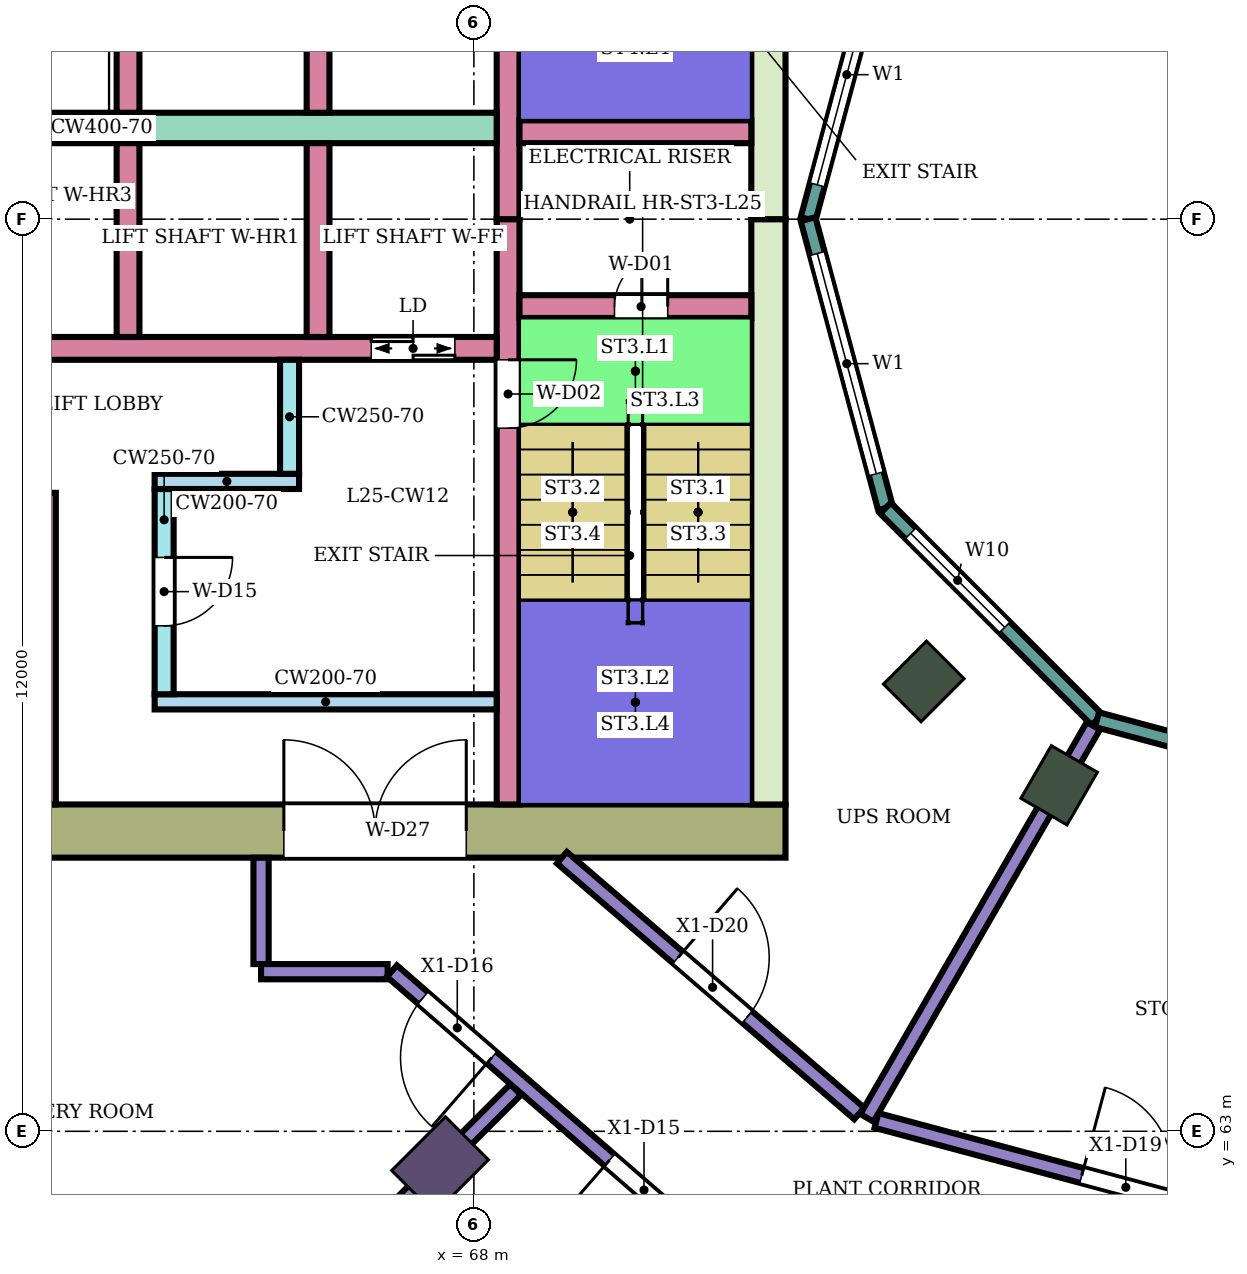
"""IFC4 building model, lengths in metres.
Left out: names, types, materials, properties, quantities, classifications, styles, units other than length and angle.
Written with IfcOpenShell. Run it as: python <this file> out.ifc"""

import sys

from ifc_helpers import new_model, si_unit, direction, frame, frame_2d, origin, origin_2d, place, context, subcontext, project, spatial, rectangle, extrude, element, fill, save


model = new_model("IFC4")
c1 = context("Model", 3, precision=1e-05, world=origin(), true_north=direction((0.0, 1.0)))
c2 = subcontext(c1, "Body", "Model", "MODEL_VIEW")
j1 = project(units=[si_unit("LENGTHUNIT", "METRE"), si_unit("PLANEANGLEUNIT", "RADIAN")], contexts=[c1])
p1 = place(None, origin())
s1 = spatial("IfcSite", under=j1, at=p1, CompositionType="ELEMENT")
p2 = place(p1, origin())
s2 = spatial("IfcBuilding", under=s1, at=p2, CompositionType="ELEMENT")
p3 = place(p2, frame((0.0, 0.0, 109.0)))
s3 = spatial("IfcBuildingStorey", under=s2, at=p3, CompositionType="ELEMENT", Elevation=109.0)
p4 = place(p3, frame((67.555, 62.555, 0.0), z_axis=(0.0, 0.0, 1.0), x_axis=(-0.707106781187, -0.707106781187, 0.0)))
e1 = element("IfcColumn", 1, at=p4, inside=s3, PredefinedType="COLUMN", context=c2, shape_type="SweptSolid", body=[
    extrude(rectangle(XDim=1.0, YDim=0.8, at=origin_2d()), origin(), (0.0, 0.0, 1.0), 5.6),
])
for number, where, z_axis, x_axis in (
    (2, (73.919, 68.919, 0.0), (0.0, 0.0, 1.0), (-0.707, -0.707, 0.0)),
    (3, (75.7, 67.552, 0.0), (0.0, 0.0, 1.0), (-0.5, -0.866, 0.0)),
):
    element("IfcColumn", number, at=place(p3, frame(where, z_axis=z_axis, x_axis=x_axis)), inside=s3, PredefinedType="COLUMN", context=c2, shape_type="SweptSolid", body=[
        extrude(rectangle(XDim=0.8, YDim=0.7, at=origin_2d()), origin(), (0.0, 0.0, 1.0), 5.6),
    ])
p5 = place(p3, frame((72.1, 66.95, 0.0), z_axis=(0.0, 0.0, 1.0), x_axis=(-1.0, 0.0, 0.0)))
e4 = element("IfcWall", 4, at=p5, inside=s3, PredefinedType="SHEAR", context=c2, shape_type="SweptSolid", body=[
    extrude(rectangle(XDim=14.8, YDim=0.7, at=frame_2d((7.4, 0.0))), origin(), (0.0, 0.0, 1.0), 5.28),
])
p6 = place(p5, frame((4.2, 0.0, 0.0)))
e5 = element("IfcOpeningElement", 5, at=p6, cuts=e4, PredefinedType="OPENING", context=c2, shape_type="SweptSolid", body=[
    extrude(rectangle(XDim=2.4, YDim=2.4, at=frame_2d((1.2, 1.2))), frame((0.0, 0.36, 0.0), z_axis=(0.0, -1.0, 0.0), x_axis=(1.0, 0.0, 0.0)), (0.0, 0.0, 1.0), 0.72),
])
for number, where, z_axis, x_axis in (
    (6, (71.875, 75.0, 0.0), (0.0, 0.0, 1.0), (0.0, -1.0, 0.0)),
    (7, (71.875, 82.7, 0.0), (0.0, 0.0, 1.0), (0.0, -1.0, 0.0)),
):
    element("IfcWall", number, at=place(p3, frame(where, z_axis=z_axis, x_axis=x_axis)), inside=s3, PredefinedType="SHEAR", context=c2, shape_type="SweptSolid", body=[
        extrude(rectangle(XDim=7.7, YDim=0.45, at=frame_2d((3.85, 0.0))), origin(), (0.0, 0.0, 1.0), 5.28),
    ])
p7 = place(p3, frame((68.45, 75.0, 0.0), z_axis=(0.0, 0.0, 1.0), x_axis=(0.0, -1.0, 0.0)))
e8 = element("IfcWall", 8, at=p7, inside=s3, PredefinedType="SHEAR", context=c2, shape_type="SweptSolid", body=[
    extrude(rectangle(XDim=7.7, YDim=0.3, at=frame_2d((3.85, 0.0))), origin(), (0.0, 0.0, 1.0), 5.28),
])
p8 = place(p7, frame((1.85, 0.0, 0.0)))
e9 = element("IfcOpeningElement", 9, at=p8, cuts=e8, PredefinedType="OPENING", context=c2, shape_type="SweptSolid", body=[
    extrude(rectangle(XDim=0.9, YDim=2.1, at=frame_2d((0.45, 1.05))), frame((0.0, 0.16, 0.0), z_axis=(0.0, -1.0, 0.0), x_axis=(1.0, 0.0, 0.0)), (0.0, 0.0, 1.0), 0.32),
])
p9 = place(p3, frame((68.45, 82.7, 0.0), z_axis=(0.0, 0.0, 1.0), x_axis=(0.0, -1.0, 0.0)))
e10 = element("IfcWall", 10, at=p9, inside=s3, PredefinedType="SHEAR", context=c2, shape_type="SweptSolid", body=[
    extrude(rectangle(XDim=7.7, YDim=0.3, at=frame_2d((3.85, 0.0))), origin(), (0.0, 0.0, 1.0), 5.28),
])
p10 = place(p9, frame((0.35, 0.0, 0.0)))
e11 = element("IfcOpeningElement", 11, at=p10, cuts=e10, PredefinedType="OPENING", context=c2, shape_type="SweptSolid", body=[
    extrude(rectangle(XDim=0.9, YDim=2.1, at=frame_2d((0.45, 1.05))), frame((0.0, 0.16, 0.0), z_axis=(0.0, -1.0, 0.0), x_axis=(1.0, 0.0, 0.0)), (0.0, 0.0, 1.0), 0.32),
])
p11 = place(p3, frame((71.65, 73.85, 0.0), z_axis=(0.0, 0.0, 1.0), x_axis=(-1.0, 0.0, 0.0)))
e12 = element("IfcWall", 12, at=p11, inside=s3, PredefinedType="SHEAR", context=c2, shape_type="SweptSolid", body=[
    extrude(rectangle(XDim=3.05, YDim=0.3, at=frame_2d((1.525, 0.0))), origin(), (0.0, 0.0, 1.0), 5.28),
])
p12 = place(p11, frame((1.1, 0.0, 0.0)))
e13 = element("IfcOpeningElement", 13, at=p12, cuts=e12, PredefinedType="OPENING", context=c2, shape_type="SweptSolid", body=[
    extrude(rectangle(XDim=0.7, YDim=2.0, at=frame_2d((0.35, 1.0))), frame((0.0, 0.16, 0.0), z_axis=(0.0, -1.0, 0.0), x_axis=(1.0, 0.0, 0.0)), (0.0, 0.0, 1.0), 0.32),
])
p13 = place(p3, frame((71.65, 76.15, 0.0), z_axis=(0.0, 0.0, 1.0), x_axis=(-1.0, 0.0, 0.0)))
e14 = element("IfcWall", 14, at=p13, inside=s3, PredefinedType="SHEAR", context=c2, shape_type="SweptSolid", body=[
    extrude(rectangle(XDim=3.05, YDim=0.3, at=frame_2d((1.525, 0.0))), origin(), (0.0, 0.0, 1.0), 5.28),
])
p14 = place(p3, frame((68.3, 73.3, 0.0), z_axis=(0.0, 0.0, 1.0), x_axis=(-1.0, 0.0, 0.0)))
e15 = element("IfcWall", 15, at=p14, inside=s3, PredefinedType="SHEAR", context=c2, shape_type="SweptSolid", body=[
    extrude(rectangle(XDim=11.0, YDim=0.3, at=frame_2d((5.5, 0.0))), origin(), (0.0, 0.0, 1.0), 5.28),
])
p15 = place(p14, frame((0.55, 0.0, 0.0)))
e16 = element("IfcOpeningElement", 16, at=p15, cuts=e15, PredefinedType="OPENING", context=c2, shape_type="SweptSolid", body=[
    extrude(rectangle(XDim=1.1, YDim=2.1, at=frame_2d((0.55, 1.05))), frame((0.0, 0.16, 0.0), z_axis=(0.0, -1.0, 0.0), x_axis=(1.0, 0.0, 0.0)), (0.0, 0.0, 1.0), 0.32),
])
p16 = place(p14, frame((8.1, 0.0, 0.0)))
e17 = element("IfcOpeningElement", 17, at=p16, cuts=e15, PredefinedType="OPENING", context=c2, shape_type="SweptSolid", body=[
    extrude(rectangle(XDim=1.0, YDim=2.1, at=frame_2d((0.5, 1.05))), frame((0.0, 0.16, 0.0), z_axis=(0.0, -1.0, 0.0), x_axis=(1.0, 0.0, 0.0)), (0.0, 0.0, 1.0), 0.32),
])
p17 = place(p3, frame((68.3, 76.2, 0.0), z_axis=(0.0, 0.0, 1.0), x_axis=(-1.0, 0.0, 0.0)))
e18 = element("IfcWall", 18, at=p17, inside=s3, PredefinedType="SHEAR", context=c2, shape_type="SweptSolid", body=[
    extrude(rectangle(XDim=11.0, YDim=0.4, at=frame_2d((5.5, 0.0))), origin(), (0.0, 0.0, 1.0), 5.28),
])
for number, where, z_axis, x_axis in (
    (19, (65.95, 76.0, 0.0), (0.0, 0.0, 1.0), (0.0, -1.0, 0.0)),
    (20, (63.45, 76.0, 0.0), (0.0, 0.0, 1.0), (0.0, -1.0, 0.0)),
    (21, (65.95, 78.95, 0.0), (0.0, 0.0, 1.0), (0.0, -1.0, 0.0)),
    (22, (63.45, 78.95, 0.0), (0.0, 0.0, 1.0), (0.0, -1.0, 0.0)),
):
    element("IfcWall", number, at=place(p3, frame(where, z_axis=z_axis, x_axis=x_axis)), inside=s3, PredefinedType="SHEAR", context=c2, shape_type="SweptSolid", body=[
        extrude(rectangle(XDim=2.55, YDim=0.3, at=frame_2d((1.275, 0.0))), origin(), (0.0, 0.0, 1.0), 5.28),
    ])
p18 = place(p3, frame((68.3, 68.65, 0.0), z_axis=(0.0, 0.0, 1.0), x_axis=(-1.0, 0.0, 0.0)))
e23 = element("IfcWall", 23, at=p18, inside=s3, PredefinedType="SHEAR", context=c2, shape_type="SweptSolid", body=[
    extrude(rectangle(XDim=4.5, YDim=0.2, at=frame_2d((2.25, 0.0))), origin(), (0.0, 0.0, 1.0), 5.28),
])
p19 = place(p3, frame((63.925, 71.45, 0.0), z_axis=(0.0, 0.0, 1.0), x_axis=(0.0, -1.0, 0.0)))
e24 = element("IfcWall", 24, at=p19, inside=s3, PredefinedType="SHEAR", context=c2, shape_type="SweptSolid", body=[
    extrude(rectangle(XDim=2.7, YDim=0.25, at=frame_2d((1.35, 0.0))), origin(), (0.0, 0.0, 1.0), 5.28),
])
p20 = place(p19, frame((0.9, 0.0, 0.0)))
e25 = element("IfcOpeningElement", 25, at=p20, cuts=e24, PredefinedType="OPENING", context=c2, shape_type="SweptSolid", body=[
    extrude(rectangle(XDim=0.9, YDim=2.1, at=frame_2d((0.45, 1.05))), frame((0.0, 0.135, 0.0), z_axis=(0.0, -1.0, 0.0), x_axis=(1.0, 0.0, 0.0)), (0.0, 0.0, 1.0), 0.27),
])
p21 = place(p3, frame((65.7, 71.55, 0.0), z_axis=(0.0, 0.0, 1.0), x_axis=(-1.0, 0.0, 0.0)))
e26 = element("IfcWall", 26, at=p21, inside=s3, PredefinedType="SHEAR", context=c2, shape_type="SweptSolid", body=[
    extrude(rectangle(XDim=1.9, YDim=0.2, at=frame_2d((0.95, 0.0))), origin(), (0.0, 0.0, 1.0), 5.28),
])
p22 = place(p3, frame((65.575, 73.15, 0.0), z_axis=(0.0, 0.0, 1.0), x_axis=(0.0, -1.0, 0.0)))
e27 = element("IfcWall", 27, at=p22, inside=s3, PredefinedType="SHEAR", context=c2, shape_type="SweptSolid", body=[
    extrude(rectangle(XDim=1.5, YDim=0.25, at=frame_2d((0.75, 0.0))), origin(), (0.0, 0.0, 1.0), 5.28),
])
p23 = place(p3, frame((62.35, 71.4, 0.0), z_axis=(0.0, 0.0, 1.0), x_axis=(0.0, -1.0, 0.0)))
e28 = element("IfcWall", 28, at=p23, inside=s3, PredefinedType="SHEAR", context=c2, shape_type="SweptSolid", body=[
    extrude(rectangle(XDim=4.1, YDim=0.3, at=frame_2d((2.05, 0.0))), origin(), (0.0, 0.0, 1.0), 5.28),
])
p24 = place(p3, frame((73.415, 78.802, 0.0), z_axis=(0.0, 0.0, 1.0), x_axis=(-0.258789828301, -0.965933654434, 0.0)))
e29 = element("IfcWall", 29, at=p24, inside=s3, PredefinedType="NOTDEFINED", context=c2, shape_type="SweptSolid", body=[
    extrude(rectangle(XDim=3.936, YDim=0.2, at=frame_2d((1.968, 0.0))), origin(), (0.0, 0.0, 1.0), 5.6),
])
p25 = place(p24, frame((0.468, 0.0, 0.9)))
e30 = element("IfcOpeningElement", 30, at=p25, cuts=e29, PredefinedType="OPENING", context=c2, shape_type="SweptSolid", body=[
    extrude(rectangle(XDim=3.0, YDim=2.3, at=frame_2d((1.5, 1.15))), frame((0.0, 0.11, 0.0), z_axis=(0.0, -1.0, 0.0), x_axis=(1.0, 0.0, 0.0)), (0.0, 0.0, 1.0), 0.22),
])
p26 = place(p3, frame((72.396, 75.0, 0.0), z_axis=(0.0, 0.0, 1.0), x_axis=(0.258789828301, -0.965933654434, 0.0)))
e31 = element("IfcWall", 31, at=p26, inside=s3, PredefinedType="NOTDEFINED", context=c2, shape_type="SweptSolid", body=[
    extrude(rectangle(XDim=3.936, YDim=0.2, at=frame_2d((1.968, 0.0))), origin(), (0.0, 0.0, 1.0), 5.6),
])
p27 = place(p26, frame((0.468, 0.0, 0.9)))
e32 = element("IfcOpeningElement", 32, at=p27, cuts=e31, PredefinedType="OPENING", context=c2, shape_type="SweptSolid", body=[
    extrude(rectangle(XDim=3.0, YDim=2.3, at=frame_2d((1.5, 1.15))), frame((0.0, 0.11, 0.0), z_axis=(0.0, -1.0, 0.0), x_axis=(1.0, 0.0, 0.0)), (0.0, 0.0, 1.0), 0.22),
])
p28 = place(p3, frame((73.415, 71.198, 0.0), z_axis=(0.0, 0.0, 1.0), x_axis=(0.707106781187, -0.707106781187, 0.0)))
e33 = element("IfcWall", 33, at=p28, inside=s3, PredefinedType="NOTDEFINED", context=c2, shape_type="SweptSolid", body=[
    extrude(rectangle(XDim=3.936, YDim=0.2, at=frame_2d((1.968, 0.0))), origin(), (0.0, 0.0, 1.0), 5.6),
])
p29 = place(p28, frame((0.468, 0.0, 0.9)))
e34 = element("IfcOpeningElement", 34, at=p29, cuts=e33, PredefinedType="OPENING", context=c2, shape_type="SweptSolid", body=[
    extrude(rectangle(XDim=1.75, YDim=2.3, at=frame_2d((0.875, 1.15))), frame((0.0, 0.11, 0.0), z_axis=(0.0, -1.0, 0.0), x_axis=(1.0, 0.0, 0.0)), (0.0, 0.0, 1.0), 0.22),
])
p30 = place(p3, frame((76.198, 68.415, 0.0), z_axis=(0.0, 0.0, 1.0), x_axis=(0.965933654434, -0.258789828301, 0.0)))
e35 = element("IfcWall", 35, at=p30, inside=s3, PredefinedType="NOTDEFINED", context=c2, shape_type="SweptSolid", body=[
    extrude(rectangle(XDim=3.936, YDim=0.2, at=frame_2d((1.968, 0.0))), origin(), (0.0, 0.0, 1.0), 5.6),
])
p31 = place(p30, frame((2.118, 0.0, 0.9)))
e36 = element("IfcOpeningElement", 36, at=p31, cuts=e35, PredefinedType="OPENING", context=c2, shape_type="SweptSolid", body=[
    extrude(rectangle(XDim=1.35, YDim=2.3, at=frame_2d((0.675, 1.15))), frame((0.0, 0.11, 0.0), z_axis=(0.0, -1.0, 0.0), x_axis=(1.0, 0.0, 0.0)), (0.0, 0.0, 1.0), 0.22),
])
p32 = place(p3, frame((63.596, 58.596, 0.0), z_axis=(0.0, 0.0, 1.0), x_axis=(0.707106781187, 0.707106781187, 0.0)))
e37 = element("IfcWall", 37, at=p32, inside=s3, PredefinedType="PARTITIONING", context=c2, shape_type="SweptSolid", body=[
    extrude(rectangle(XDim=7.005, YDim=0.2, at=frame_2d((3.502, 0.0))), origin(), (0.0, 0.0, 1.0), 5.15),
])
p33 = place(p3, frame((65.2, 65.2, 0.0), z_axis=(0.0, 0.0, 1.0), x_axis=(0.0, 1.0, 0.0)))
e38 = element("IfcWall", 38, at=p33, inside=s3, PredefinedType="PARTITIONING", context=c2, shape_type="SweptSolid", body=[
    extrude(rectangle(XDim=1.399, YDim=0.2, at=frame_2d((0.7, 0.0))), origin(), (0.0, 0.0, 1.0), 5.15),
])
p34 = place(p3, frame((65.2, 65.1, 0.0), z_axis=(0.0, 0.0, 1.0), x_axis=(1.0, 0.0, 0.0)))
e39 = element("IfcWall", 39, at=p34, inside=s3, PredefinedType="PARTITIONING", context=c2, shape_type="SweptSolid", body=[
    extrude(rectangle(XDim=1.665, YDim=0.2, at=frame_2d((0.833, 0.0))), origin(), (0.0, 0.0, 1.0), 5.15),
])
p35 = place(p3, frame((66.922, 65.108, 0.0), z_axis=(0.0, 0.0, 1.0), x_axis=(0.755027260387, -0.655693400968, 0.0)))
e40 = element("IfcWall", 40, at=p35, inside=s3, PredefinedType="PARTITIONING", context=c2, shape_type="SweptSolid", body=[
    extrude(rectangle(XDim=6.516, YDim=0.2, at=frame_2d((3.258, 0.0))), origin(), (0.0, 0.0, 1.0), 5.15),
])
p36 = place(p35, frame((3.792, 0.0, 0.0)))
e41 = element("IfcOpeningElement", 41, at=p36, cuts=e40, PredefinedType="OPENING", context=c2, shape_type="SweptSolid", body=[
    extrude(rectangle(XDim=1.2, YDim=2.4, at=frame_2d((0.6, 1.2))), frame((0.0, 0.11, 0.0), z_axis=(0.0, -1.0, 0.0), x_axis=(1.0, 0.0, 0.0)), (0.0, 0.0, 1.0), 0.22),
])
p37 = place(p35, frame((0.539, 0.0, 0.0)))
e42 = element("IfcOpeningElement", 42, at=p37, cuts=e40, PredefinedType="OPENING", context=c2, shape_type="SweptSolid", body=[
    extrude(rectangle(XDim=1.2, YDim=2.4, at=frame_2d((0.6, 1.2))), frame((0.0, 0.11, 0.0), z_axis=(0.0, -1.0, 0.0), x_axis=(1.0, 0.0, 0.0)), (0.0, 0.0, 1.0), 0.22),
])
p38 = place(p3, frame((69.158, 66.6, 0.0), z_axis=(0.0, 0.0, 1.0), x_axis=(0.758063092745, -0.652181222835, 0.0)))
e43 = element("IfcWall", 43, at=p38, inside=s3, PredefinedType="PARTITIONING", context=c2, shape_type="SweptSolid", body=[
    extrude(rectangle(XDim=5.16, YDim=0.2, at=frame_2d((2.58, 0.0))), origin(), (0.0, 0.0, 1.0), 5.15),
])
p39 = place(p38, frame((2.015, 0.0, 0.0)))
e44 = element("IfcOpeningElement", 44, at=p39, cuts=e43, PredefinedType="OPENING", context=c2, shape_type="SweptSolid", body=[
    extrude(rectangle(XDim=1.2, YDim=2.4, at=frame_2d((0.6, 1.2))), frame((0.0, 0.11, 0.0), z_axis=(0.0, -1.0, 0.0), x_axis=(1.0, 0.0, 0.0)), (0.0, 0.0, 1.0), 0.22),
])
p40 = place(p3, frame((73.297, 63.143, 0.0), z_axis=(0.0, 0.0, 1.0), x_axis=(0.965899714105, -0.258916477443, 0.0)))
e45 = element("IfcWall", 45, at=p40, inside=s3, PredefinedType="PARTITIONING", context=c2, shape_type="SweptSolid", body=[
    extrude(rectangle(XDim=6.81, YDim=0.2, at=frame_2d((3.405, 0.0))), origin(), (0.0, 0.0, 1.0), 5.15),
])
p41 = place(p40, frame((2.796, 0.0, 0.0)))
e46 = element("IfcOpeningElement", 46, at=p41, cuts=e45, PredefinedType="OPENING", context=c2, shape_type="SweptSolid", body=[
    extrude(rectangle(XDim=1.2, YDim=2.4, at=frame_2d((0.6, 1.2))), frame((0.0, 0.11, 0.0), z_axis=(0.0, -1.0, 0.0), x_axis=(1.0, 0.0, 0.0)), (0.0, 0.0, 1.0), 0.22),
])
p42 = place(p3, frame((73.172, 63.177, 0.0), z_axis=(0.0, 0.0, 1.0), x_axis=(0.500080872431, 0.86597870703, 0.0)))
e47 = element("IfcWall", 47, at=p42, inside=s3, PredefinedType="PARTITIONING", context=c2, shape_type="SweptSolid", body=[
    extrude(rectangle(XDim=5.955, YDim=0.2, at=frame_2d((2.978, 0.0))), origin(), (0.0, 0.0, 1.0), 5.15),
])
p43 = place(p25, origin())
e48 = element("IfcWindow", 48, at=p43, inside=s3, PartitioningType="SINGLE_PANEL", PredefinedType="WINDOW", context=c2, shape_type="SweptSolid", body=[
    extrude(rectangle(XDim=3.0, YDim=2.3, at=frame_2d((1.5, 1.15))), frame((0.0, 0.03, 0.0), z_axis=(0.0, -1.0, 0.0), x_axis=(1.0, 0.0, 0.0)), (0.0, 0.0, 1.0), 0.06),
])
fill(e30, e48)
p44 = place(p27, origin())
e49 = element("IfcWindow", 49, at=p44, inside=s3, PartitioningType="SINGLE_PANEL", PredefinedType="WINDOW", context=c2, shape_type="SweptSolid", body=[
    extrude(rectangle(XDim=3.0, YDim=2.3, at=frame_2d((1.5, 1.15))), frame((0.0, 0.03, 0.0), z_axis=(0.0, -1.0, 0.0), x_axis=(1.0, 0.0, 0.0)), (0.0, 0.0, 1.0), 0.06),
])
fill(e32, e49)
p45 = place(p29, origin())
e50 = element("IfcWindow", 50, at=p45, inside=s3, PartitioningType="SINGLE_PANEL", PredefinedType="WINDOW", context=c2, shape_type="SweptSolid", body=[
    extrude(rectangle(XDim=1.75, YDim=2.3, at=frame_2d((0.875, 1.15))), frame((0.0, 0.03, 0.0), z_axis=(0.0, -1.0, 0.0), x_axis=(1.0, 0.0, 0.0)), (0.0, 0.0, 1.0), 0.06),
])
fill(e34, e50)
p46 = place(p36, frame((1.2, 0.0, 0.0), z_axis=(0.0, 0.0, 1.0), x_axis=(-1.0, 0.0, 0.0)))
e51 = element("IfcDoor", 51, at=p46, inside=s3, OperationType="SINGLE_SWING_RIGHT", PredefinedType="DOOR", context=c2, shape_type="SweptSolid", body=[
    extrude(rectangle(XDim=1.2, YDim=2.4, at=frame_2d((0.6, 1.2))), frame((0.0, 0.025, 0.0), z_axis=(0.0, -1.0, 0.0), x_axis=(1.0, 0.0, 0.0)), (0.0, 0.0, 1.0), 0.05),
])
fill(e41, e51)
p47 = place(p37, frame((1.2, 0.0, 0.0), z_axis=(0.0, 0.0, 1.0), x_axis=(-1.0, 0.0, 0.0)))
e52 = element("IfcDoor", 52, at=p47, inside=s3, OperationType="SINGLE_SWING_LEFT", PredefinedType="DOOR", context=c2, shape_type="SweptSolid", body=[
    extrude(rectangle(XDim=1.2, YDim=2.4, at=frame_2d((0.6, 1.2))), frame((0.0, 0.025, 0.0), z_axis=(0.0, -1.0, 0.0), x_axis=(1.0, 0.0, 0.0)), (0.0, 0.0, 1.0), 0.05),
])
fill(e42, e52)
p48 = place(p41, origin())
e53 = element("IfcDoor", 53, at=p48, inside=s3, OperationType="SINGLE_SWING_LEFT", PredefinedType="DOOR", context=c2, shape_type="SweptSolid", body=[
    extrude(rectangle(XDim=1.2, YDim=2.4, at=frame_2d((0.6, 1.2))), frame((0.0, 0.025, 0.0), z_axis=(0.0, -1.0, 0.0), x_axis=(1.0, 0.0, 0.0)), (0.0, 0.0, 1.0), 0.05),
])
fill(e46, e53)
p49 = place(p39, origin())
e54 = element("IfcDoor", 54, at=p49, inside=s3, OperationType="SINGLE_SWING_LEFT", PredefinedType="DOOR", context=c2, shape_type="SweptSolid", body=[
    extrude(rectangle(XDim=1.2, YDim=2.4, at=frame_2d((0.6, 1.2))), frame((0.0, 0.025, 0.0), z_axis=(0.0, -1.0, 0.0), x_axis=(1.0, 0.0, 0.0)), (0.0, 0.0, 1.0), 0.05),
])
fill(e44, e54)
p50 = place(p12, frame((0.7, 0.0, 0.0), z_axis=(0.0, 0.0, 1.0), x_axis=(-1.0, 0.0, 0.0)))
e55 = element("IfcDoor", 55, at=p50, inside=s3, OperationType="SINGLE_SWING_RIGHT", PredefinedType="DOOR", context=c2, shape_type="SweptSolid", body=[
    extrude(rectangle(XDim=0.7, YDim=2.0, at=frame_2d((0.35, 1.0))), frame((0.0, 0.025, 0.0), z_axis=(0.0, -1.0, 0.0), x_axis=(1.0, 0.0, 0.0)), (0.0, 0.0, 1.0), 0.05),
])
fill(e13, e55)
p51 = place(p8, origin())
e56 = element("IfcDoor", 56, at=p51, inside=s3, OperationType="SINGLE_SWING_LEFT", PredefinedType="DOOR", context=c2, shape_type="SweptSolid", body=[
    extrude(rectangle(XDim=0.9, YDim=2.1, at=frame_2d((0.45, 1.05))), frame((0.0, 0.025, 0.0), z_axis=(0.0, -1.0, 0.0), x_axis=(1.0, 0.0, 0.0)), (0.0, 0.0, 1.0), 0.05),
])
fill(e9, e56)
p52 = place(p15, origin())
e57 = element("IfcDoor", 57, at=p52, inside=s3, OperationType="DOUBLE_DOOR_SLIDING", PredefinedType="DOOR", context=c2, shape_type="SweptSolid", body=[
    extrude(rectangle(XDim=1.1, YDim=2.1, at=frame_2d((0.55, 1.05))), frame((0.0, 0.025, 0.0), z_axis=(0.0, -1.0, 0.0), x_axis=(1.0, 0.0, 0.0)), (0.0, 0.0, 1.0), 0.05),
])
fill(e16, e57)
p53 = place(p20, origin())
e58 = element("IfcDoor", 58, at=p53, inside=s3, OperationType="SINGLE_SWING_LEFT", PredefinedType="DOOR", context=c2, shape_type="SweptSolid", body=[
    extrude(rectangle(XDim=0.9, YDim=2.1, at=frame_2d((0.45, 1.05))), frame((0.0, 0.025, 0.0), z_axis=(0.0, -1.0, 0.0), x_axis=(1.0, 0.0, 0.0)), (0.0, 0.0, 1.0), 0.05),
])
fill(e25, e58)
p54 = place(p6, frame((2.4, 0.0, 0.0), z_axis=(0.0, 0.0, 1.0), x_axis=(-1.0, 0.0, 0.0)))
e59 = element("IfcDoor", 59, at=p54, inside=s3, OperationType="DOUBLE_DOOR_SINGLE_SWING", PredefinedType="DOOR", context=c2, shape_type="SweptSolid", body=[
    extrude(rectangle(XDim=2.4, YDim=2.4, at=frame_2d((1.2, 1.2))), frame((0.0, 0.025, 0.0), z_axis=(0.0, -1.0, 0.0), x_axis=(1.0, 0.0, 0.0)), (0.0, 0.0, 1.0), 0.05),
])
fill(e5, e59)
save(model, sys.argv[1])
